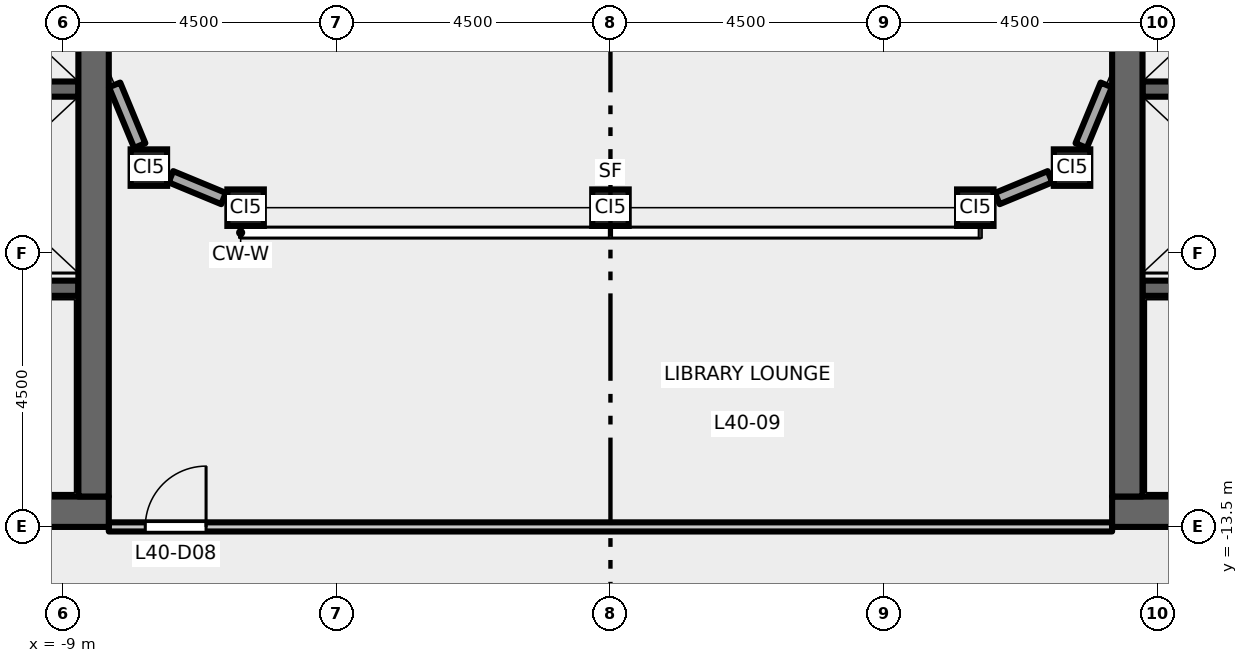
"""IFC4 building model, lengths in metres.
Left out: names, types, materials, properties, quantities, classifications, styles, units other than length and angle.
Written with IfcOpenShell. Run it as: python <this file> out.ifc"""

import sys

from ifc_helpers import new_model, si_unit, direction, frame, frame_2d, origin, origin_2d, place, context, subcontext, project, spatial, rectangle, hollow_rectangle, extrude, element, fill, save


model = new_model("IFC4")
c1 = context("Model", 3, precision=1e-05, world=origin(), true_north=direction((0.0, 1.0)))
c2 = subcontext(c1, "Body", "Model", "MODEL_VIEW")
j1 = project(units=[si_unit("LENGTHUNIT", "METRE"), si_unit("PLANEANGLEUNIT", "RADIAN")], contexts=[c1])
p1 = place(None, origin())
s1 = spatial("IfcSite", under=j1, at=p1, CompositionType="ELEMENT")
p2 = place(p1, origin())
s2 = spatial("IfcBuilding", under=s1, at=p2, CompositionType="ELEMENT")
p3 = place(p2, frame((0.0, 0.0, 187.2)))
s3 = spatial("IfcBuildingStorey", under=s2, at=p3, CompositionType="ELEMENT", Elevation=187.2)
for number, where, z_axis, x_axis in (
    (1, (-7.591, -7.591, 0.0), (0.0, 0.0, 1.0), (1.0, 0.0, 0.0)),
    (2, (-6.0, -8.25, 0.0), (0.0, 0.0, 1.0), (1.0, 0.0, 0.0)),
    (3, (0.0, -8.25, 0.0), (0.0, 0.0, 1.0), (1.0, 0.0, 0.0)),
    (4, (6.0, -8.25, 0.0), (0.0, 0.0, 1.0), (1.0, 0.0, 0.0)),
    (5, (7.591, -7.591, 0.0), (0.0, 0.0, 1.0), (1.0, 0.0, 0.0)),
):
    element("IfcColumn", number, at=place(p3, frame(where, z_axis=z_axis, x_axis=x_axis)), inside=s3, PredefinedType="COLUMN", context=c2, shape_type="SweptSolid", body=[
        extrude(hollow_rectangle(XDim=0.6, YDim=0.6, WallThickness=0.032, at=origin_2d()), origin(), (0.0, 0.0, 1.0), 5.5),
    ])
p4 = place(p3, frame((-8.75, -6.3, 0.0), z_axis=(0.0, 0.0, 1.0), x_axis=(-1.0, 0.0, 0.0)))
e6 = element("IfcWall", 6, at=p4, inside=s3, PredefinedType="SHEAR", context=c2, shape_type="SweptSolid", body=[
    extrude(rectangle(XDim=3.1, YDim=0.25, at=frame_2d((1.55, 0.0))), origin(), (0.0, 0.0, 1.0), 5.35),
])
p5 = place(p3, frame((-8.75, -9.575, 0.0), z_axis=(0.0, 0.0, 1.0), x_axis=(-1.0, 0.0, 0.0)))
e7 = element("IfcWall", 7, at=p5, inside=s3, PredefinedType="SHEAR", context=c2, shape_type="SweptSolid", body=[
    extrude(rectangle(XDim=8.0, YDim=0.25, at=frame_2d((4.0, 0.0))), origin(), (0.0, 0.0, 1.0), 5.35),
])
p6 = place(p5, frame((6.65, 0.0, 0.0)))
e8 = element("IfcOpeningElement", 8, at=p6, cuts=e7, PredefinedType="OPENING", context=c2, shape_type="SweptSolid", body=[
    extrude(rectangle(XDim=1.1, YDim=2.1, at=frame_2d((0.55, 1.05))), frame((0.0, 0.135, 0.0), z_axis=(0.0, -1.0, 0.0), x_axis=(1.0, 0.0, 0.0)), (0.0, 0.0, 1.0), 0.27),
])
p7 = place(p3, frame((-8.25, -13.25, 0.0), z_axis=(0.0, 0.0, 1.0), x_axis=(-1.0, 0.0, 0.0)))
e9 = element("IfcWall", 9, at=p7, inside=s3, PredefinedType="SHEAR", context=c2, shape_type="SweptSolid", body=[
    extrude(rectangle(XDim=13.5, YDim=0.5, at=frame_2d((6.75, 0.0))), origin(), (0.0, 0.0, 1.0), 5.35),
])
p8 = place(p3, frame((-8.5, -13.0, 0.0), z_axis=(0.0, 0.0, 1.0), x_axis=(0.0, 1.0, 0.0)))
e10 = element("IfcWall", 10, at=p8, inside=s3, PredefinedType="SHEAR", context=c2, shape_type="SweptSolid", body=[
    extrude(rectangle(XDim=26.0, YDim=0.5, at=frame_2d((13.0, 0.0))), origin(), (0.0, 0.0, 1.0), 5.35),
])
p9 = place(p3, frame((8.75, -6.3, 0.0), z_axis=(0.0, 0.0, 1.0), x_axis=(1.0, 0.0, 0.0)))
e11 = element("IfcWall", 11, at=p9, inside=s3, PredefinedType="SHEAR", context=c2, shape_type="SweptSolid", body=[
    extrude(rectangle(XDim=3.1, YDim=0.25, at=frame_2d((1.55, 0.0))), origin(), (0.0, 0.0, 1.0), 5.35),
])
p10 = place(p3, frame((8.75, -9.575, 0.0), z_axis=(0.0, 0.0, 1.0), x_axis=(1.0, 0.0, 0.0)))
e12 = element("IfcWall", 12, at=p10, inside=s3, PredefinedType="SHEAR", context=c2, shape_type="SweptSolid", body=[
    extrude(rectangle(XDim=8.0, YDim=0.25, at=frame_2d((4.0, 0.0))), origin(), (0.0, 0.0, 1.0), 5.35),
])
p11 = place(p10, frame((6.65, 0.0, 0.0)))
e13 = element("IfcOpeningElement", 13, at=p11, cuts=e12, PredefinedType="OPENING", context=c2, shape_type="SweptSolid", body=[
    extrude(rectangle(XDim=1.1, YDim=2.1, at=frame_2d((0.55, 1.05))), frame((0.0, 0.135, 0.0), z_axis=(0.0, -1.0, 0.0), x_axis=(1.0, 0.0, 0.0)), (0.0, 0.0, 1.0), 0.27),
])
p12 = place(p3, frame((8.25, -13.25, 0.0), z_axis=(0.0, 0.0, 1.0), x_axis=(1.0, 0.0, 0.0)))
e14 = element("IfcWall", 14, at=p12, inside=s3, PredefinedType="SHEAR", context=c2, shape_type="SweptSolid", body=[
    extrude(rectangle(XDim=13.5, YDim=0.5, at=frame_2d((6.75, 0.0))), origin(), (0.0, 0.0, 1.0), 5.35),
])
p13 = place(p3, frame((8.5, -13.0, 0.0), z_axis=(0.0, 0.0, 1.0), x_axis=(0.0, 1.0, 0.0)))
e15 = element("IfcWall", 15, at=p13, inside=s3, PredefinedType="SHEAR", context=c2, shape_type="SweptSolid", body=[
    extrude(rectangle(XDim=26.0, YDim=0.5, at=frame_2d((13.0, 0.0))), origin(), (0.0, 0.0, 1.0), 5.35),
])
p14 = place(p3, frame((6.362, -8.1, 0.0), z_axis=(0.0, 0.0, 1.0), x_axis=(0.923829670615, 0.382803787458, 0.0)))
e16 = element("IfcWall", 16, at=p14, inside=s3, PredefinedType="STANDARD", context=c2, shape_type="SweptSolid", body=[
    extrude(rectangle(XDim=0.938, YDim=0.2, at=frame_2d((0.469, 0.0))), origin(), (0.0, 0.0, 1.0), 4.918),
])
for number, where, z_axis, x_axis in (
    (17, (7.741, -7.229, 0.0), (0.0, 0.0, 1.0), (0.383, 0.924, 0.0)),
    (18, (-8.154, -6.231, 0.0), (0.0, 0.0, 1.0), (0.383, -0.924, 0.0)),
):
    element("IfcWall", number, at=place(p3, frame(where, z_axis=z_axis, x_axis=x_axis)), inside=s3, PredefinedType="STANDARD", context=c2, shape_type="SweptSolid", body=[
        extrude(rectangle(XDim=1.08, YDim=0.2, at=frame_2d((0.54, 0.0))), origin(), (0.0, 0.0, 1.0), 4.918),
    ])
p15 = place(p3, frame((-7.229, -7.741, 0.0), z_axis=(0.0, 0.0, 1.0), x_axis=(0.923829670615, -0.382803787458, 0.0)))
e19 = element("IfcWall", 19, at=p15, inside=s3, PredefinedType="STANDARD", context=c2, shape_type="SweptSolid", body=[
    extrude(rectangle(XDim=0.938, YDim=0.2, at=frame_2d((0.469, 0.0))), origin(), (0.0, 0.0, 1.0), 4.918),
])
p16 = place(p3, frame((-8.25, -13.5, 0.0), z_axis=(0.0, 0.0, 1.0), x_axis=(1.0, 0.0, 0.0)))
e20 = element("IfcWall", 20, at=p16, inside=s3, PredefinedType="PARTITIONING", context=c2, shape_type="SweptSolid", body=[
    extrude(rectangle(XDim=16.5, YDim=0.15, at=frame_2d((8.25, 0.0))), origin(), (0.0, 0.0, 1.0), 4.95),
])
p17 = place(p16, frame((0.6, 0.0, 0.0)))
e21 = element("IfcOpeningElement", 21, at=p17, cuts=e20, PredefinedType="OPENING", context=c2, shape_type="SweptSolid", body=[
    extrude(rectangle(XDim=1.0, YDim=2.1, at=frame_2d((0.5, 1.05))), frame((0.0, 0.085, 0.0), z_axis=(0.0, -1.0, 0.0), x_axis=(1.0, 0.0, 0.0)), (0.0, 0.0, 1.0), 0.17),
])
p18 = place(p17, origin())
e22 = element("IfcDoor", 22, at=p18, inside=s3, OperationType="SINGLE_SWING_RIGHT", PredefinedType="DOOR", context=c2, shape_type="SweptSolid", body=[
    extrude(rectangle(XDim=1.0, YDim=2.1, at=frame_2d((0.5, 1.05))), frame((0.0, 0.025, 0.0), z_axis=(0.0, -1.0, 0.0), x_axis=(1.0, 0.0, 0.0)), (0.0, 0.0, 1.0), 0.05),
])
fill(e21, e22)
save(model, sys.argv[1])
